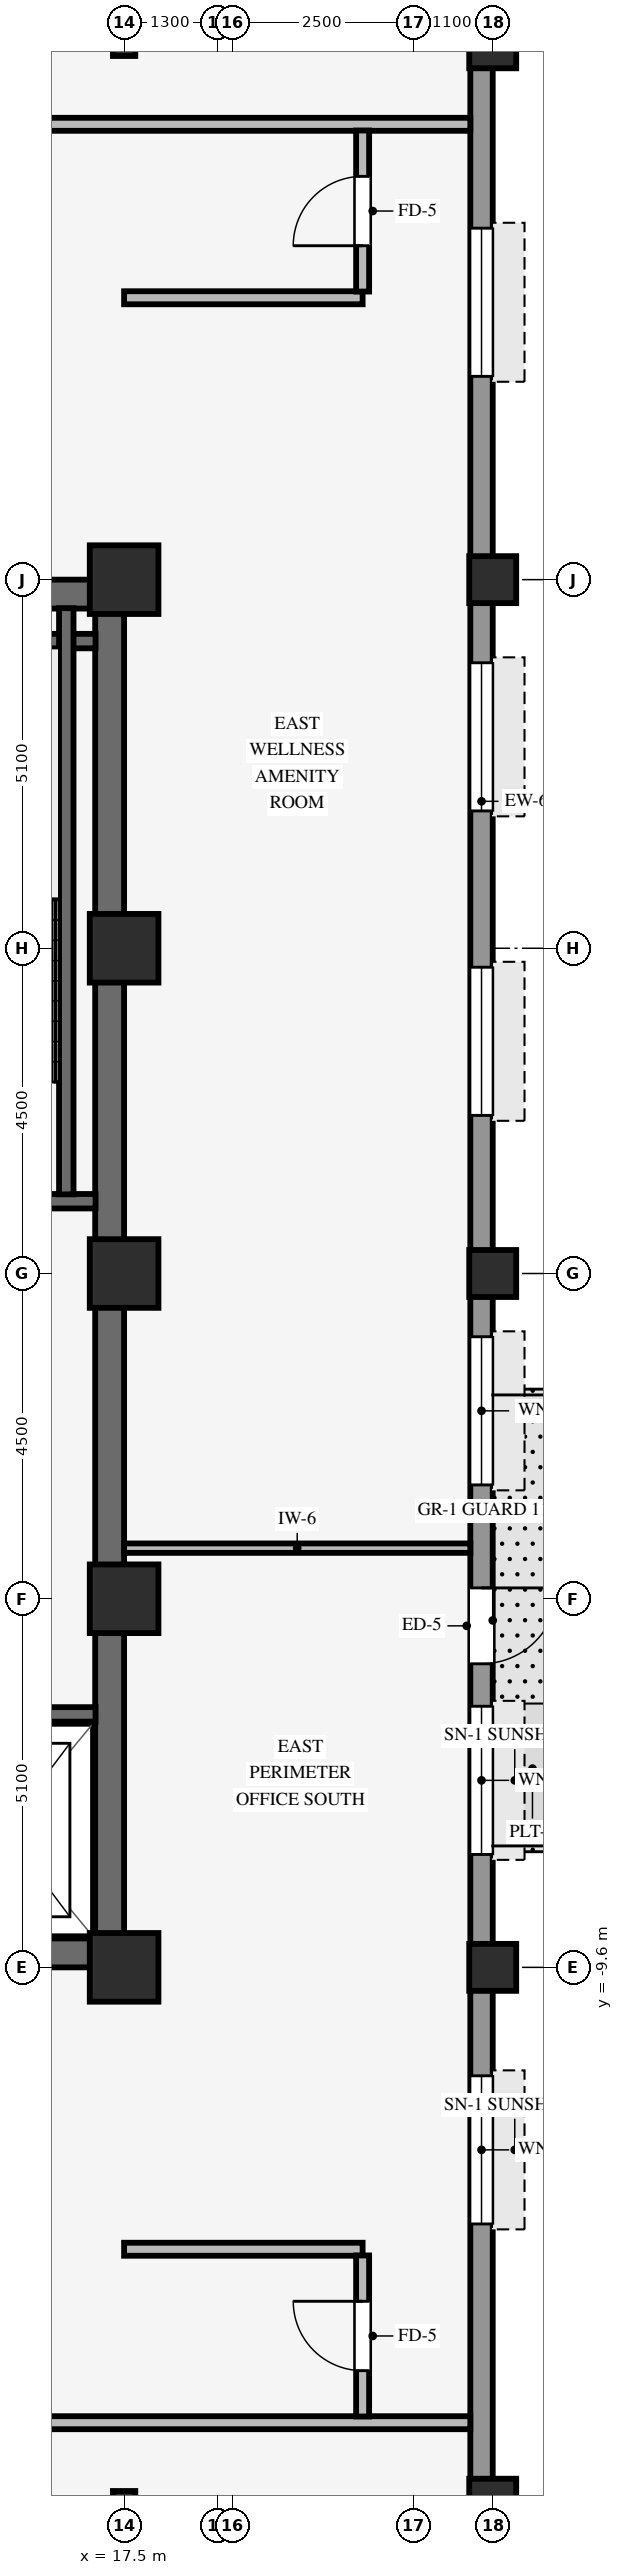
"""IFC4 building model, lengths in metres.
Left out: names, types, materials, properties, quantities, classifications, styles, units other than length and angle.
Written with IfcOpenShell. Run it as: python <this file> out.ifc"""

import sys

from ifc_helpers import new_model, si_unit, direction, frame, frame_2d, origin, origin_2d, place, context, subcontext, project, spatial, rectangle, hollow_rectangle, i_section, extrude, source, transform, mapped, element, fill, save


model = new_model("IFC4")
c1 = context("Model", 3, precision=1e-05, world=origin(), true_north=direction((0.0, 1.0)))
c2 = subcontext(c1, "Body", "Model", "MODEL_VIEW")
j1 = project(units=[si_unit("LENGTHUNIT", "METRE"), si_unit("PLANEANGLEUNIT", "RADIAN")], contexts=[c1])
p1 = place(None, origin())
s1 = spatial("IfcSite", under=j1, at=p1, CompositionType="ELEMENT")
p2 = place(p1, origin())
s2 = spatial("IfcBuilding", under=s1, at=p2, CompositionType="ELEMENT")
p3 = place(p2, frame((0.0, 0.0, 178.6)))
s3 = spatial("IfcBuildingStorey", under=s2, at=p3, CompositionType="ELEMENT", Elevation=178.6)
for number, where, z_axis, x_axis in (
    (1, (9.0, -9.4, 0.0), (0.0, 0.0, 1.0), (1.0, 0.0, 0.0)),
    (2, (9.0, 9.4, 0.0), (0.0, 0.0, 1.0), (1.0, 0.0, 0.0)),
):
    element("IfcWall", number, at=place(p3, frame(where, z_axis=z_axis, x_axis=x_axis)), inside=s3, PredefinedType="SHEAR", context=c2, shape_type="SweptSolid", body=[
        extrude(rectangle(XDim=8.5, YDim=0.4, at=frame_2d((4.25, 0.0))), origin(), (0.0, 0.0, 1.0), 3.37),
    ])
p4 = place(p3, frame((17.3, -9.205, 0.0), z_axis=(0.0, 0.0, 1.0), x_axis=(0.0, 1.0, 0.0)))
e3 = element("IfcWall", 3, at=p4, inside=s3, PredefinedType="SHEAR", context=c2, shape_type="SweptSolid", body=[
    extrude(rectangle(XDim=18.41, YDim=0.4, at=frame_2d((9.205, 0.0))), origin(), (0.0, 0.0, 1.0), 3.37),
])
for number, where, z_axis, x_axis in (
    (4, (17.5, -9.6, 0.0), (0.0, 0.0, 1.0), (1.0, 0.0, 0.0)),
    (5, (17.5, -4.5, 0.0), (0.0, 0.0, 1.0), (1.0, 0.0, 0.0)),
    (6, (17.5, 4.5, 0.0), (0.0, 0.0, 1.0), (1.0, 0.0, 0.0)),
    (7, (17.5, 9.6, 0.0), (0.0, 0.0, 1.0), (1.0, 0.0, 0.0)),
    (8, (17.5, 0.0, 0.0), (0.0, 0.0, 1.0), (1.0, 0.0, 0.0)),
):
    element("IfcColumn", number, at=place(p3, frame(where, z_axis=z_axis, x_axis=x_axis)), inside=s3, PredefinedType="COLUMN", context=c2, shape_type="SweptSolid", body=[
        extrude(rectangle(XDim=0.95, YDim=0.95, at=origin_2d()), origin(), (0.0, 0.0, 1.0), 3.37),
    ])
for number, where, z_axis, x_axis in (
    (9, (22.6, -17.0, 0.0), (0.0, 0.0, 1.0), (1.0, 0.0, 0.0)),
    (10, (22.6, -9.6, 0.0), (0.0, 0.0, 1.0), (1.0, 0.0, 0.0)),
    (11, (22.6, 0.0, 0.0), (0.0, 0.0, 1.0), (1.0, 0.0, 0.0)),
    (12, (22.6, 9.6, 0.0), (0.0, 0.0, 1.0), (1.0, 0.0, 0.0)),
    (13, (22.6, 17.0, 0.0), (0.0, 0.0, 1.0), (1.0, 0.0, 0.0)),
):
    element("IfcColumn", number, at=place(p3, frame(where, z_axis=z_axis, x_axis=x_axis)), inside=s3, PredefinedType="COLUMN", context=c2, shape_type="SweptSolid", body=[
        extrude(hollow_rectangle(XDim=0.65, YDim=0.65, WallThickness=0.04, InnerFilletRadius=0.04, OuterFilletRadius=0.08, at=origin_2d()), origin(), (0.0, 0.0, 1.0), 3.37),
    ])
for number, where, z_axis, x_axis in (
    (14, (17.5, -17.0, 0.0), (0.0, 0.0, 1.0), (1.0, 0.0, 0.0)),
    (15, (17.5, 17.0, 0.0), (0.0, 0.0, 1.0), (1.0, 0.0, 0.0)),
):
    element("IfcColumn", number, at=place(p3, frame(where, z_axis=z_axis, x_axis=x_axis)), inside=s3, PredefinedType="COLUMN", context=c2, shape_type="SweptSolid", body=[
        extrude(i_section(OverallWidth=0.31, OverallDepth=0.31, WebThickness=0.015, FlangeThickness=0.015, FilletRadius=0.015, at=origin_2d()), origin(), (0.0, 0.0, 1.0), 3.37),
    ])
p5 = place(p3, frame((22.445, -20.794, 0.0), z_axis=(0.0, 0.0, 1.0), x_axis=(0.0, 1.0, 0.0)))
e16 = element("IfcWall", 16, at=p5, inside=s3, PredefinedType="STANDARD", context=c2, shape_type="SweptSolid", body=[
    extrude(rectangle(XDim=37.788, YDim=0.31, at=frame_2d((18.894, 0.0))), origin(), (0.0, 0.0, 1.0), 2.705),
])
p6 = place(p5, frame((16.444, 0.0, 0.0), z_axis=(0.0, 0.0, 1.0), x_axis=(-1.0, 0.0, 0.0)))
e17 = element("IfcOpeningElement", 17, at=p6, cuts=e16, PredefinedType="OPENING", context=c2, shape_type="SweptSolid", body=[
    extrude(rectangle(XDim=1.05, YDim=2.1, at=frame_2d((0.525, 1.05))), frame((0.0, 0.165, 0.0), z_axis=(0.0, -1.0, 0.0), x_axis=(1.0, 0.0, 0.0)), (0.0, 0.0, 1.0), 0.33),
])
p7 = place(p5, frame((7.644, 0.0, 0.8)))
e18 = element("IfcOpeningElement", 18, at=p7, cuts=e16, PredefinedType="OPENING", context=c2, shape_type="SweptSolid", body=[
    extrude(rectangle(XDim=2.05, YDim=1.52, at=frame_2d((1.025, 0.76))), frame((0.0, 0.165, 0.0), z_axis=(0.0, -1.0, 0.0), x_axis=(1.0, 0.0, 0.0)), (0.0, 0.0, 1.0), 0.33),
])
p8 = place(p5, frame((12.756, 0.0, 0.8)))
e19 = element("IfcOpeningElement", 19, at=p8, cuts=e16, PredefinedType="OPENING", context=c2, shape_type="SweptSolid", body=[
    extrude(rectangle(XDim=2.05, YDim=1.52, at=frame_2d((1.025, 0.76))), frame((0.0, 0.165, 0.0), z_axis=(0.0, -1.0, 0.0), x_axis=(1.0, 0.0, 0.0)), (0.0, 0.0, 1.0), 0.33),
])
p9 = place(p5, frame((17.869, 0.0, 0.8)))
e20 = element("IfcOpeningElement", 20, at=p9, cuts=e16, PredefinedType="OPENING", context=c2, shape_type="SweptSolid", body=[
    extrude(rectangle(XDim=2.05, YDim=1.52, at=frame_2d((1.025, 0.76))), frame((0.0, 0.165, 0.0), z_axis=(0.0, -1.0, 0.0), x_axis=(1.0, 0.0, 0.0)), (0.0, 0.0, 1.0), 0.33),
])
p10 = place(p5, frame((22.982, 0.0, 0.8)))
e21 = element("IfcOpeningElement", 21, at=p10, cuts=e16, PredefinedType="OPENING", context=c2, shape_type="SweptSolid", body=[
    extrude(rectangle(XDim=2.05, YDim=1.52, at=frame_2d((1.025, 0.76))), frame((0.0, 0.165, 0.0), z_axis=(0.0, -1.0, 0.0), x_axis=(1.0, 0.0, 0.0)), (0.0, 0.0, 1.0), 0.33),
])
p11 = place(p5, frame((27.194, 0.0, 0.8)))
e22 = element("IfcOpeningElement", 22, at=p11, cuts=e16, PredefinedType="OPENING", context=c2, shape_type="SweptSolid", body=[
    extrude(rectangle(XDim=2.05, YDim=1.52, at=frame_2d((1.025, 0.76))), frame((0.0, 0.165, 0.0), z_axis=(0.0, -1.0, 0.0), x_axis=(1.0, 0.0, 0.0)), (0.0, 0.0, 1.0), 0.33),
])
p12 = place(p5, frame((33.207, 0.0, 0.8)))
e23 = element("IfcOpeningElement", 23, at=p12, cuts=e16, PredefinedType="OPENING", context=c2, shape_type="SweptSolid", body=[
    extrude(rectangle(XDim=2.05, YDim=1.52, at=frame_2d((1.025, 0.76))), frame((0.0, 0.165, 0.0), z_axis=(0.0, -1.0, 0.0), x_axis=(1.0, 0.0, 0.0)), (0.0, 0.0, 1.0), 0.33),
])
for number, where, z_axis, x_axis in (
    (24, (13.535, 1.0, 0.0), (0.0, 0.0, 1.0), (1.0, 0.0, 0.0)),
    (25, (13.535, 8.75, 0.0), (0.0, 0.0, 1.0), (1.0, 0.0, 0.0)),
):
    element("IfcWall", number, at=place(p3, frame(where, z_axis=z_axis, x_axis=x_axis)), inside=s3, PredefinedType="SHEAR", context=c2, shape_type="SweptSolid", body=[
        extrude(rectangle(XDim=3.57, YDim=0.2, at=frame_2d((1.785, 0.0))), origin(), (0.0, 0.0, 1.0), 3.37),
    ])
p13 = place(p3, frame((16.7, 1.095, 0.0), z_axis=(0.0, 0.0, 1.0), x_axis=(0.0, 1.0, 0.0)))
e26 = element("IfcWall", 26, at=p13, inside=s3, PredefinedType="SHEAR", context=c2, shape_type="SweptSolid", body=[
    extrude(rectangle(XDim=8.11, YDim=0.2, at=frame_2d((4.055, 0.0))), origin(), (0.0, 0.0, 1.0), 3.37),
])
p14 = place(p3, frame((14.645, -6.1, 0.0), z_axis=(0.0, 0.0, 1.0), x_axis=(1.0, 0.0, 0.0)))
e27 = element("IfcWall", 27, at=p14, inside=s3, PredefinedType="SHEAR", context=c2, shape_type="SweptSolid", body=[
    extrude(rectangle(XDim=2.46, YDim=0.2, at=frame_2d((1.23, 0.0))), origin(), (0.0, 0.0, 1.0), 3.37),
])
p15 = place(p3, frame((-26.09, -15.9, 0.0), z_axis=(0.0, 0.0, 1.0), x_axis=(1.0, 0.0, 0.0)))
e28 = element("IfcWall", 28, at=p15, inside=s3, PredefinedType="PARTITIONING", context=c2, shape_type="SweptSolid", body=[
    extrude(rectangle(XDim=48.38, YDim=0.18, at=frame_2d((24.19, 0.0))), origin(), (0.0, 0.0, 1.0), 3.36),
])
p16 = place(p15, frame((40.51, 0.0, 0.0)))
e29 = element("IfcOpeningElement", 29, at=p16, cuts=e28, PredefinedType="OPENING", context=c2, shape_type="SweptSolid", body=[
    extrude(rectangle(XDim=0.96, YDim=2.1, at=frame_2d((0.48, 1.05))), frame((0.0, 0.1, 0.0), z_axis=(0.0, -1.0, 0.0), x_axis=(1.0, 0.0, 0.0)), (0.0, 0.0, 1.0), 0.2),
])
p17 = place(p15, frame((19.995, 0.0, 0.0)))
e30 = element("IfcOpeningElement", 30, at=p17, cuts=e28, PredefinedType="OPENING", context=c2, shape_type="SweptSolid", body=[
    extrude(rectangle(XDim=0.96, YDim=2.1, at=frame_2d((0.48, 1.05))), frame((0.0, 0.1, 0.0), z_axis=(0.0, -1.0, 0.0), x_axis=(1.0, 0.0, 0.0)), (0.0, 0.0, 1.0), 0.2),
])
p18 = place(p15, frame((28.45, 0.0, 0.0)))
e31 = element("IfcOpeningElement", 31, at=p18, cuts=e28, PredefinedType="OPENING", context=c2, shape_type="SweptSolid", body=[
    extrude(rectangle(XDim=0.96, YDim=2.1, at=frame_2d((0.48, 1.05))), frame((0.0, 0.1, 0.0), z_axis=(0.0, -1.0, 0.0), x_axis=(1.0, 0.0, 0.0)), (0.0, 0.0, 1.0), 0.2),
])
p19 = place(p15, frame((11.605, 0.0, 0.0)))
e32 = element("IfcOpeningElement", 32, at=p19, cuts=e28, PredefinedType="OPENING", context=c2, shape_type="SweptSolid", body=[
    extrude(rectangle(XDim=0.96, YDim=2.1, at=frame_2d((0.48, 1.05))), frame((0.0, 0.1, 0.0), z_axis=(0.0, -1.0, 0.0), x_axis=(1.0, 0.0, 0.0)), (0.0, 0.0, 1.0), 0.2),
])
p20 = place(p15, frame((2.465, 0.0, 0.0)))
e33 = element("IfcOpeningElement", 33, at=p20, cuts=e28, PredefinedType="OPENING", context=c2, shape_type="SweptSolid", body=[
    extrude(rectangle(XDim=0.96, YDim=2.1, at=frame_2d((0.48, 1.05))), frame((0.0, 0.1, 0.0), z_axis=(0.0, -1.0, 0.0), x_axis=(1.0, 0.0, 0.0)), (0.0, 0.0, 1.0), 0.2),
])
p21 = place(p3, frame((17.5, -13.5, 0.0), z_axis=(0.0, 0.0, 1.0), x_axis=(1.0, 0.0, 0.0)))
e34 = element("IfcWall", 34, at=p21, inside=s3, PredefinedType="PARTITIONING", context=c2, shape_type="SweptSolid", body=[
    extrude(rectangle(XDim=3.3, YDim=0.18, at=frame_2d((1.65, 0.0))), origin(), (0.0, 0.0, 1.0), 3.008),
])
p22 = place(p3, frame((17.5, -3.8, 0.0), z_axis=(0.0, 0.0, 1.0), x_axis=(1.0, 0.0, 0.0)))
e35 = element("IfcWall", 35, at=p22, inside=s3, PredefinedType="PARTITIONING", context=c2, shape_type="SweptSolid", body=[
    extrude(rectangle(XDim=4.79, YDim=0.13, at=frame_2d((2.395, 0.0))), origin(), (0.0, 0.0, 1.0), 3.36),
])
p23 = place(p3, frame((17.5, 13.5, 0.0), z_axis=(0.0, 0.0, 1.0), x_axis=(1.0, 0.0, 0.0)))
e36 = element("IfcWall", 36, at=p23, inside=s3, PredefinedType="PARTITIONING", context=c2, shape_type="SweptSolid", body=[
    extrude(rectangle(XDim=3.3, YDim=0.18, at=frame_2d((1.65, 0.0))), origin(), (0.0, 0.0, 1.0), 3.008),
])
p24 = place(p3, frame((-26.09, 15.9, 0.0), z_axis=(0.0, 0.0, 1.0), x_axis=(1.0, 0.0, 0.0)))
e37 = element("IfcWall", 37, at=p24, inside=s3, PredefinedType="PARTITIONING", context=c2, shape_type="SweptSolid", body=[
    extrude(rectangle(XDim=48.38, YDim=0.18, at=frame_2d((24.19, 0.0))), origin(), (0.0, 0.0, 1.0), 3.36),
])
p25 = place(p24, frame((41.36, 0.0, 0.0)))
e38 = element("IfcOpeningElement", 38, at=p25, cuts=e37, PredefinedType="OPENING", context=c2, shape_type="SweptSolid", body=[
    extrude(rectangle(XDim=0.96, YDim=2.1, at=frame_2d((0.48, 1.05))), frame((0.0, 0.1, 0.0), z_axis=(0.0, -1.0, 0.0), x_axis=(1.0, 0.0, 0.0)), (0.0, 0.0, 1.0), 0.2),
])
p26 = place(p24, frame((23.35, 0.0, 0.0)))
e39 = element("IfcOpeningElement", 39, at=p26, cuts=e37, PredefinedType="OPENING", context=c2, shape_type="SweptSolid", body=[
    extrude(rectangle(XDim=0.96, YDim=2.1, at=frame_2d((0.48, 1.05))), frame((0.0, 0.1, 0.0), z_axis=(0.0, -1.0, 0.0), x_axis=(1.0, 0.0, 0.0)), (0.0, 0.0, 1.0), 0.2),
])
p27 = place(p24, frame((14.41, 0.0, 0.0)))
e40 = element("IfcOpeningElement", 40, at=p27, cuts=e37, PredefinedType="OPENING", context=c2, shape_type="SweptSolid", body=[
    extrude(rectangle(XDim=0.96, YDim=2.1, at=frame_2d((0.48, 1.05))), frame((0.0, 0.1, 0.0), z_axis=(0.0, -1.0, 0.0), x_axis=(1.0, 0.0, 0.0)), (0.0, 0.0, 1.0), 0.2),
])
p28 = place(p24, frame((30.015, 0.0, 0.0)))
e41 = element("IfcOpeningElement", 41, at=p28, cuts=e37, PredefinedType="OPENING", context=c2, shape_type="SweptSolid", body=[
    extrude(rectangle(XDim=0.96, YDim=2.1, at=frame_2d((0.48, 1.05))), frame((0.0, 0.1, 0.0), z_axis=(0.0, -1.0, 0.0), x_axis=(1.0, 0.0, 0.0)), (0.0, 0.0, 1.0), 0.2),
])
p29 = place(p24, frame((6.66, 0.0, 0.0)))
e42 = element("IfcOpeningElement", 42, at=p29, cuts=e37, PredefinedType="OPENING", context=c2, shape_type="SweptSolid", body=[
    extrude(rectangle(XDim=0.96, YDim=2.1, at=frame_2d((0.48, 1.05))), frame((0.0, 0.1, 0.0), z_axis=(0.0, -1.0, 0.0), x_axis=(1.0, 0.0, 0.0)), (0.0, 0.0, 1.0), 0.2),
])
p30 = place(p3, frame((20.8, -15.814, 0.0), z_axis=(0.0, 0.0, 1.0), x_axis=(0.0, 1.0, 0.0)))
e43 = element("IfcWall", 43, at=p30, inside=s3, PredefinedType="PARTITIONING", context=c2, shape_type="SweptSolid", body=[
    extrude(rectangle(XDim=2.228, YDim=0.18, at=frame_2d((1.114, 0.0))), origin(), (0.0, 0.0, 1.0), 3.36),
])
p31 = place(p30, frame((0.634, 0.0, 0.0)))
e44 = element("IfcOpeningElement", 44, at=p31, cuts=e43, PredefinedType="OPENING", context=c2, shape_type="SweptSolid", body=[
    extrude(rectangle(XDim=0.96, YDim=2.1, at=frame_2d((0.48, 1.05))), frame((0.0, 0.1, 0.0), z_axis=(0.0, -1.0, 0.0), x_axis=(1.0, 0.0, 0.0)), (0.0, 0.0, 1.0), 0.2),
])
p32 = place(p3, frame((20.8, 13.586, 0.0), z_axis=(0.0, 0.0, 1.0), x_axis=(0.0, 1.0, 0.0)))
e45 = element("IfcWall", 45, at=p32, inside=s3, PredefinedType="PARTITIONING", context=c2, shape_type="SweptSolid", body=[
    extrude(rectangle(XDim=2.228, YDim=0.18, at=frame_2d((1.114, 0.0))), origin(), (0.0, 0.0, 1.0), 3.36),
])
p33 = place(p32, frame((0.634, 0.0, 0.0)))
e46 = element("IfcOpeningElement", 46, at=p33, cuts=e45, PredefinedType="OPENING", context=c2, shape_type="SweptSolid", body=[
    extrude(rectangle(XDim=0.96, YDim=2.1, at=frame_2d((0.48, 1.05))), frame((0.0, 0.1, 0.0), z_axis=(0.0, -1.0, 0.0), x_axis=(1.0, 0.0, 0.0)), (0.0, 0.0, 1.0), 0.2),
])
m1 = source(origin(), c2, "Body", "SweptSolid", [
    extrude(rectangle(XDim=1.05, YDim=2.1, at=frame_2d((0.525, 1.05))), frame((0.0, 0.025, 0.0), z_axis=(0.0, -1.0, 0.0), x_axis=(1.0, 0.0, 0.0)), (0.0, 0.0, 1.0), 0.05),
])
p34 = place(p6, origin())
e47 = element("IfcDoor", 47, at=p34, inside=s3, OperationType="SINGLE_SWING_LEFT", PredefinedType="DOOR", context=c2, shape_type="MappedRepresentation", body=[
    mapped(m1, transform((0.0, 0.0, 0.0), scale=1.0)),
])
fill(e17, e47)
m2 = source(origin(), c2, "Body", "SweptSolid", [
    extrude(rectangle(XDim=2.05, YDim=1.52, at=frame_2d((1.025, 0.76))), frame((0.0, 0.03, 0.0), z_axis=(0.0, -1.0, 0.0), x_axis=(1.0, 0.0, 0.0)), (0.0, 0.0, 1.0), 0.06),
])
p35 = place(p7, origin())
e48 = element("IfcWindow", 48, at=p35, inside=s3, PartitioningType="SINGLE_PANEL", PredefinedType="WINDOW", context=c2, shape_type="MappedRepresentation", body=[
    mapped(m2, transform((0.0, 0.0, 0.0), scale=1.0)),
])
fill(e18, e48)
p36 = place(p8, origin())
e49 = element("IfcWindow", 49, at=p36, inside=s3, PartitioningType="SINGLE_PANEL", PredefinedType="WINDOW", context=c2, shape_type="MappedRepresentation", body=[
    mapped(m2, transform((0.0, 0.0, 0.0), scale=1.0)),
])
fill(e19, e49)
p37 = place(p9, origin())
e50 = element("IfcWindow", 50, at=p37, inside=s3, PartitioningType="SINGLE_PANEL", PredefinedType="WINDOW", context=c2, shape_type="MappedRepresentation", body=[
    mapped(m2, transform((0.0, 0.0, 0.0), scale=1.0)),
])
fill(e20, e50)
p38 = place(p10, origin())
e51 = element("IfcWindow", 51, at=p38, inside=s3, PartitioningType="SINGLE_PANEL", PredefinedType="WINDOW", context=c2, shape_type="MappedRepresentation", body=[
    mapped(m2, transform((0.0, 0.0, 0.0), scale=1.0)),
])
fill(e21, e51)
p39 = place(p11, origin())
e52 = element("IfcWindow", 52, at=p39, inside=s3, PartitioningType="SINGLE_PANEL", PredefinedType="WINDOW", context=c2, shape_type="MappedRepresentation", body=[
    mapped(m2, transform((0.0, 0.0, 0.0), scale=1.0)),
])
fill(e22, e52)
p40 = place(p12, origin())
e53 = element("IfcWindow", 53, at=p40, inside=s3, PartitioningType="SINGLE_PANEL", PredefinedType="WINDOW", context=c2, shape_type="MappedRepresentation", body=[
    mapped(m2, transform((0.0, 0.0, 0.0), scale=1.0)),
])
fill(e23, e53)
m3 = source(origin(), c2, "Body", "SweptSolid", [
    extrude(rectangle(XDim=0.96, YDim=2.1, at=frame_2d((0.48, 1.05))), frame((0.0, 0.025, 0.0), z_axis=(0.0, -1.0, 0.0), x_axis=(1.0, 0.0, 0.0)), (0.0, 0.0, 1.0), 0.05),
])
p41 = place(p31, origin())
e54 = element("IfcDoor", 54, at=p41, inside=s3, OperationType="SINGLE_SWING_RIGHT", PredefinedType="DOOR", context=c2, shape_type="MappedRepresentation", body=[
    mapped(m3, transform((0.0, 0.0, 0.0), scale=1.0)),
])
fill(e44, e54)
p42 = place(p33, origin())
e55 = element("IfcDoor", 55, at=p42, inside=s3, OperationType="SINGLE_SWING_LEFT", PredefinedType="DOOR", context=c2, shape_type="MappedRepresentation", body=[
    mapped(m3, transform((0.0, 0.0, 0.0), scale=1.0)),
])
fill(e46, e55)
save(model, sys.argv[1])
